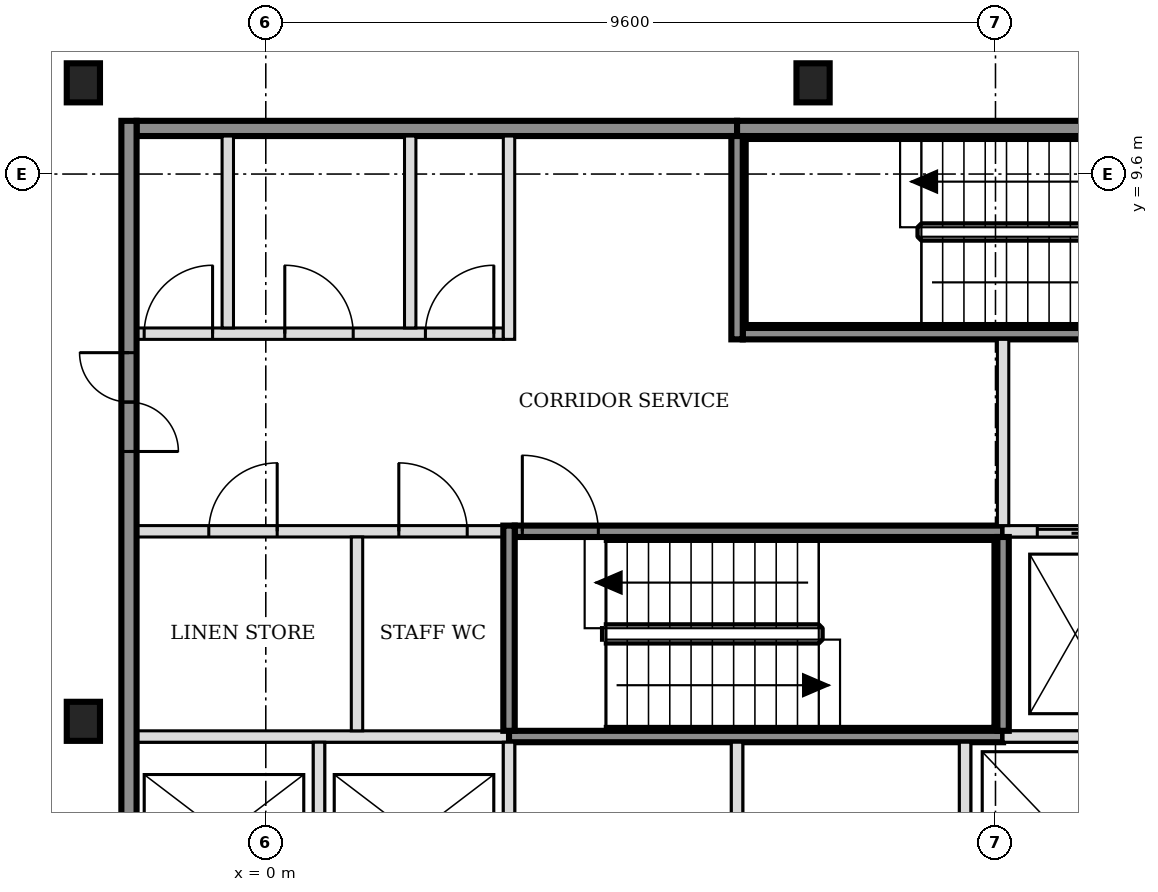
"""IFC4 building model, lengths in metres.
Left out: names, types, materials, properties, quantities, classifications, styles, units other than length and angle.
Written with IfcOpenShell. Run it as: python <this file> out.ifc"""

import sys

from ifc_helpers import new_model, si_unit, direction, frame, frame_2d, origin, origin_2d, place, context, subcontext, project, spatial, rectangle, i_section, extrude, element, fill, save


model = new_model("IFC4")
c1 = context("Model", 3, precision=1e-05, world=origin(), true_north=direction((0.0, 1.0)))
c2 = subcontext(c1, "Body", "Model", "MODEL_VIEW")
j1 = project(units=[si_unit("LENGTHUNIT", "METRE"), si_unit("PLANEANGLEUNIT", "RADIAN")], contexts=[c1])
p1 = place(None, origin())
s1 = spatial("IfcSite", under=j1, at=p1, CompositionType="ELEMENT")
p2 = place(p1, origin())
s2 = spatial("IfcBuilding", under=s1, at=p2, CompositionType="ELEMENT")
p3 = place(p2, frame((0.0, 0.0, 94.2)))
s3 = spatial("IfcBuildingStorey", under=s2, at=p3, CompositionType="ELEMENT", Elevation=94.2)
for number, where, z_axis, x_axis in (
    (1, (-2.4, 2.4, -0.15), (0.0, 0.0, 1.0), (1.0, 0.0, 0.0)),
    (2, (-2.4, 10.8, -0.15), (0.0, 0.0, 1.0), (1.0, 0.0, 0.0)),
    (3, (7.2, 10.8, -0.15), (0.0, 0.0, 1.0), (1.0, 0.0, 0.0)),
):
    element("IfcColumn", number, at=place(p3, frame(where, z_axis=z_axis, x_axis=x_axis)), inside=s3, PredefinedType="COLUMN", context=c2, shape_type="SweptSolid", body=[
        extrude(i_section(OverallWidth=0.437, OverallDepth=0.514, WebThickness=0.061, FlangeThickness=0.097, FilletRadius=0.015, at=origin_2d()), origin(), (0.0, 0.0, 1.0), 3.6),
    ])
p4 = place(p3, frame((-1.7, 2.2, 0.0), z_axis=(0.0, 0.0, 1.0), x_axis=(1.0, 0.0, 0.0)))
e4 = element("IfcWall", 4, at=p4, inside=s3, PredefinedType="SOLIDWALL", context=c2, shape_type="SweptSolid", body=[
    extrude(rectangle(XDim=4.9, YDim=0.15, at=frame_2d((2.45, 0.0))), origin(), (0.0, 0.0, 1.0), 3.45),
])
p5 = place(p3, frame((3.2, 2.2, 0.0), z_axis=(0.0, 0.0, 1.0), x_axis=(1.0, 0.0, 0.0)))
e5 = element("IfcWall", 5, at=p5, inside=s3, PredefinedType="SOLIDWALL", context=c2, shape_type="SweptSolid", body=[
    extrude(rectangle(XDim=6.5, YDim=0.15, at=frame_2d((3.25, 0.0))), origin(), (0.0, 0.0, 1.0), 3.45),
])
p6 = place(p3, frame((9.7, 2.2, 0.0), z_axis=(0.0, 0.0, 1.0), x_axis=(1.0, 0.0, 0.0)))
e6 = element("IfcWall", 6, at=p6, inside=s3, PredefinedType="SOLIDWALL", context=c2, shape_type="SweptSolid", body=[
    extrude(rectangle(XDim=4.525, YDim=0.15, at=frame_2d((2.263, 0.0))), origin(), (0.0, 0.0, 1.0), 3.45),
])
p7 = place(p3, frame((-1.7, 4.9, 0.0), z_axis=(0.0, 0.0, 1.0), x_axis=(1.0, 0.0, 0.0)))
e7 = element("IfcWall", 7, at=p7, inside=s3, PredefinedType="PARTITIONING", context=c2, shape_type="SweptSolid", body=[
    extrude(rectangle(XDim=4.825, YDim=0.15, at=frame_2d((2.413, 0.0))), origin(), (0.0, 0.0, 1.0), 3.45),
])
p8 = place(p7, frame((0.95, 0.0, 0.0)))
e8 = element("IfcOpeningElement", 8, at=p8, cuts=e7, PredefinedType="OPENING", context=c2, shape_type="SweptSolid", body=[
    extrude(rectangle(XDim=0.9, YDim=2.1, at=frame_2d((0.45, 1.05))), frame((0.0, 0.085, 0.0), z_axis=(0.0, -1.0, 0.0), x_axis=(1.0, 0.0, 0.0)), (0.0, 0.0, 1.0), 0.17),
])
p9 = place(p7, frame((3.45, 0.0, 0.0)))
e9 = element("IfcOpeningElement", 9, at=p9, cuts=e7, PredefinedType="OPENING", context=c2, shape_type="SweptSolid", body=[
    extrude(rectangle(XDim=0.9, YDim=2.1, at=frame_2d((0.45, 1.05))), frame((0.0, 0.085, 0.0), z_axis=(0.0, -1.0, 0.0), x_axis=(1.0, 0.0, 0.0)), (0.0, 0.0, 1.0), 0.17),
])
p10 = place(p3, frame((3.275, 4.9, 0.0), z_axis=(0.0, 0.0, 1.0), x_axis=(1.0, 0.0, 0.0)))
e10 = element("IfcWall", 10, at=p10, inside=s3, PredefinedType="SOLIDWALL", context=c2, shape_type="SweptSolid", body=[
    extrude(rectangle(XDim=6.425, YDim=0.15, at=frame_2d((3.212, 0.0))), origin(), (0.0, 0.0, 1.0), 3.45),
])
p11 = place(p10, frame((0.1, 0.0, 0.0)))
e11 = element("IfcOpeningElement", 11, at=p11, cuts=e10, PredefinedType="OPENING", context=c2, shape_type="SweptSolid", body=[
    extrude(rectangle(XDim=1.0, YDim=2.1, at=frame_2d((0.5, 1.05))), frame((0.0, 0.085, 0.0), z_axis=(0.0, -1.0, 0.0), x_axis=(1.0, 0.0, 0.0)), (0.0, 0.0, 1.0), 0.17),
])
p12 = place(p3, frame((9.7, 4.9, 0.0), z_axis=(0.0, 0.0, 1.0), x_axis=(1.0, 0.0, 0.0)))
e12 = element("IfcWall", 12, at=p12, inside=s3, PredefinedType="SOLIDWALL", context=c2, shape_type="SweptSolid", body=[
    extrude(rectangle(XDim=6.4, YDim=0.15, at=frame_2d((3.2, 0.0))), origin(), (0.0, 0.0, 1.0), 3.45),
])
p13 = place(p12, frame((0.45, 0.0, 0.0)))
e13 = element("IfcOpeningElement", 13, at=p13, cuts=e12, PredefinedType="OPENING", context=c2, shape_type="SweptSolid", body=[
    extrude(rectangle(XDim=1.0, YDim=2.1, at=frame_2d((0.5, 1.05))), frame((0.0, 0.085, 0.0), z_axis=(0.0, -1.0, 0.0), x_axis=(1.0, 0.0, 0.0)), (0.0, 0.0, 1.0), 0.17),
])
p14 = place(p12, frame((2.35, 0.0, 0.0)))
e14 = element("IfcOpeningElement", 14, at=p14, cuts=e12, PredefinedType="OPENING", context=c2, shape_type="SweptSolid", body=[
    extrude(rectangle(XDim=1.0, YDim=2.1, at=frame_2d((0.5, 1.05))), frame((0.0, 0.085, 0.0), z_axis=(0.0, -1.0, 0.0), x_axis=(1.0, 0.0, 0.0)), (0.0, 0.0, 1.0), 0.17),
])
p15 = place(p12, frame((4.7, 0.0, 0.0)))
e15 = element("IfcOpeningElement", 15, at=p15, cuts=e12, PredefinedType="OPENING", context=c2, shape_type="SweptSolid", body=[
    extrude(rectangle(XDim=0.9, YDim=2.1, at=frame_2d((0.45, 1.05))), frame((0.0, 0.085, 0.0), z_axis=(0.0, -1.0, 0.0), x_axis=(1.0, 0.0, 0.0)), (0.0, 0.0, 1.0), 0.17),
])
p16 = place(p3, frame((-1.7, 7.5, 0.0), z_axis=(0.0, 0.0, 1.0), x_axis=(1.0, 0.0, 0.0)))
e16 = element("IfcWall", 16, at=p16, inside=s3, PredefinedType="PARTITIONING", context=c2, shape_type="SweptSolid", body=[
    extrude(rectangle(XDim=4.825, YDim=0.15, at=frame_2d((2.413, 0.0))), origin(), (0.0, 0.0, 1.0), 3.45),
])
p17 = place(p16, frame((0.1, 0.0, 0.0)))
e17 = element("IfcOpeningElement", 17, at=p17, cuts=e16, PredefinedType="OPENING", context=c2, shape_type="SweptSolid", body=[
    extrude(rectangle(XDim=0.9, YDim=2.1, at=frame_2d((0.45, 1.05))), frame((0.0, 0.085, 0.0), z_axis=(0.0, -1.0, 0.0), x_axis=(1.0, 0.0, 0.0)), (0.0, 0.0, 1.0), 0.17),
])
p18 = place(p16, frame((1.95, 0.0, 0.0)))
e18 = element("IfcOpeningElement", 18, at=p18, cuts=e16, PredefinedType="OPENING", context=c2, shape_type="SweptSolid", body=[
    extrude(rectangle(XDim=0.9, YDim=2.1, at=frame_2d((0.45, 1.05))), frame((0.0, 0.085, 0.0), z_axis=(0.0, -1.0, 0.0), x_axis=(1.0, 0.0, 0.0)), (0.0, 0.0, 1.0), 0.17),
])
p19 = place(p16, frame((3.8, 0.0, 0.0)))
e19 = element("IfcOpeningElement", 19, at=p19, cuts=e16, PredefinedType="OPENING", context=c2, shape_type="SweptSolid", body=[
    extrude(rectangle(XDim=0.9, YDim=2.1, at=frame_2d((0.45, 1.05))), frame((0.0, 0.085, 0.0), z_axis=(0.0, -1.0, 0.0), x_axis=(1.0, 0.0, 0.0)), (0.0, 0.0, 1.0), 0.17),
])
p20 = place(p3, frame((6.275, 7.5, 0.0), z_axis=(0.0, 0.0, 1.0), x_axis=(1.0, 0.0, 0.0)))
e20 = element("IfcWall", 20, at=p20, inside=s3, PredefinedType="SOLIDWALL", context=c2, shape_type="SweptSolid", body=[
    extrude(rectangle(XDim=6.425, YDim=0.15, at=frame_2d((3.212, 0.0))), origin(), (0.0, 0.0, 1.0), 3.45),
])
p21 = place(p20, frame((5.225, 0.0, 0.0)))
e21 = element("IfcOpeningElement", 21, at=p21, cuts=e20, PredefinedType="OPENING", context=c2, shape_type="SweptSolid", body=[
    extrude(rectangle(XDim=1.0, YDim=2.1, at=frame_2d((0.5, 1.05))), frame((0.0, 0.085, 0.0), z_axis=(0.0, -1.0, 0.0), x_axis=(1.0, 0.0, 0.0)), (0.0, 0.0, 1.0), 0.17),
])
p22 = place(p3, frame((-1.7, 10.2, 0.0), z_axis=(0.0, 0.0, 1.0), x_axis=(1.0, 0.0, 0.0)))
e22 = element("IfcWall", 22, at=p22, inside=s3, PredefinedType="SOLIDWALL", context=c2, shape_type="SweptSolid", body=[
    extrude(rectangle(XDim=7.9, YDim=0.2, at=frame_2d((3.95, 0.0))), origin(), (0.0, 0.0, 1.0), 3.45),
])
p23 = place(p3, frame((6.2, 10.2, 0.0), z_axis=(0.0, 0.0, 1.0), x_axis=(1.0, 0.0, 0.0)))
e23 = element("IfcWall", 23, at=p23, inside=s3, PredefinedType="SOLIDWALL", context=c2, shape_type="SweptSolid", body=[
    extrude(rectangle(XDim=6.5, YDim=0.2, at=frame_2d((3.25, 0.0))), origin(), (0.0, 0.0, 1.0), 3.45),
])
p24 = place(p3, frame((-1.8, -5.5, 0.0), z_axis=(0.0, 0.0, 1.0), x_axis=(0.0, 1.0, 0.0)))
e24 = element("IfcWall", 24, at=p24, inside=s3, PredefinedType="SOLIDWALL", context=c2, shape_type="SweptSolid", body=[
    extrude(rectangle(XDim=15.8, YDim=0.2, at=frame_2d((7.9, 0.0))), origin(), (0.0, 0.0, 1.0), 3.45),
])
p25 = place(p24, frame((3.05, 0.0, 0.0)))
e25 = element("IfcOpeningElement", 25, at=p25, cuts=e24, PredefinedType="OPENING", context=c2, shape_type="SweptSolid", body=[
    extrude(rectangle(XDim=1.3, YDim=2.1, at=frame_2d((0.65, 1.05))), frame((0.0, 0.11, 0.0), z_axis=(0.0, -1.0, 0.0), x_axis=(1.0, 0.0, 0.0)), (0.0, 0.0, 1.0), 0.22),
])
p26 = place(p24, frame((11.45, 0.0, 0.0)))
e26 = element("IfcOpeningElement", 26, at=p26, cuts=e24, PredefinedType="OPENING", context=c2, shape_type="SweptSolid", body=[
    extrude(rectangle(XDim=1.3, YDim=2.1, at=frame_2d((0.65, 1.05))), frame((0.0, 0.11, 0.0), z_axis=(0.0, -1.0, 0.0), x_axis=(1.0, 0.0, 0.0)), (0.0, 0.0, 1.0), 0.22),
])
p27 = place(p3, frame((-0.5, 7.575, 0.0), z_axis=(0.0, 0.0, 1.0), x_axis=(0.0, 1.0, 0.0)))
e27 = element("IfcWall", 27, at=p27, inside=s3, PredefinedType="PARTITIONING", context=c2, shape_type="SweptSolid", body=[
    extrude(rectangle(XDim=2.525, YDim=0.15, at=frame_2d((1.263, 0.0))), origin(), (0.0, 0.0, 1.0), 3.45),
])
p28 = place(p3, frame((0.7, -0.325, 0.0), z_axis=(0.0, 0.0, 1.0), x_axis=(0.0, 1.0, 0.0)))
e28 = element("IfcWall", 28, at=p28, inside=s3, PredefinedType="SOLIDWALL", context=c2, shape_type="SweptSolid", body=[
    extrude(rectangle(XDim=2.45, YDim=0.15, at=frame_2d((1.225, 0.0))), origin(), (0.0, 0.0, 1.0), 3.45),
])
p29 = place(p3, frame((1.2, 2.275, 0.0), z_axis=(0.0, 0.0, 1.0), x_axis=(0.0, 1.0, 0.0)))
e29 = element("IfcWall", 29, at=p29, inside=s3, PredefinedType="PARTITIONING", context=c2, shape_type="SweptSolid", body=[
    extrude(rectangle(XDim=2.55, YDim=0.15, at=frame_2d((1.275, 0.0))), origin(), (0.0, 0.0, 1.0), 3.45),
])
p30 = place(p3, frame((1.9, 7.575, 0.0), z_axis=(0.0, 0.0, 1.0), x_axis=(0.0, 1.0, 0.0)))
e30 = element("IfcWall", 30, at=p30, inside=s3, PredefinedType="PARTITIONING", context=c2, shape_type="SweptSolid", body=[
    extrude(rectangle(XDim=2.525, YDim=0.15, at=frame_2d((1.263, 0.0))), origin(), (0.0, 0.0, 1.0), 3.45),
])
p31 = place(p3, frame((3.2, -0.325, 0.0), z_axis=(0.0, 0.0, 1.0), x_axis=(0.0, 1.0, 0.0)))
e31 = element("IfcWall", 31, at=p31, inside=s3, PredefinedType="SOLIDWALL", context=c2, shape_type="SweptSolid", body=[
    extrude(rectangle(XDim=2.45, YDim=0.15, at=frame_2d((1.225, 0.0))), origin(), (0.0, 0.0, 1.0), 3.45),
])
p32 = place(p3, frame((3.2, 2.275, 0.0), z_axis=(0.0, 0.0, 1.0), x_axis=(0.0, 1.0, 0.0)))
e32 = element("IfcWall", 32, at=p32, inside=s3, PredefinedType="SOLIDWALL", context=c2, shape_type="SweptSolid", body=[
    extrude(rectangle(XDim=2.7, YDim=0.15, at=frame_2d((1.35, 0.0))), origin(), (0.0, 0.0, 1.0), 3.45),
])
p33 = place(p3, frame((3.2, 7.425, 0.0), z_axis=(0.0, 0.0, 1.0), x_axis=(0.0, 1.0, 0.0)))
e33 = element("IfcWall", 33, at=p33, inside=s3, PredefinedType="PARTITIONING", context=c2, shape_type="SweptSolid", body=[
    extrude(rectangle(XDim=2.675, YDim=0.15, at=frame_2d((1.337, 0.0))), origin(), (0.0, 0.0, 1.0), 3.45),
])
p34 = place(p3, frame((6.2, -0.325, 0.0), z_axis=(0.0, 0.0, 1.0), x_axis=(0.0, 1.0, 0.0)))
e34 = element("IfcWall", 34, at=p34, inside=s3, PredefinedType="SOLIDWALL", context=c2, shape_type="SweptSolid", body=[
    extrude(rectangle(XDim=2.45, YDim=0.15, at=frame_2d((1.225, 0.0))), origin(), (0.0, 0.0, 1.0), 3.45),
])
p35 = place(p3, frame((6.2, 7.425, 0.0), z_axis=(0.0, 0.0, 1.0), x_axis=(0.0, 1.0, 0.0)))
e35 = element("IfcWall", 35, at=p35, inside=s3, PredefinedType="SOLIDWALL", context=c2, shape_type="SweptSolid", body=[
    extrude(rectangle(XDim=2.675, YDim=0.15, at=frame_2d((1.337, 0.0))), origin(), (0.0, 0.0, 1.0), 3.45),
])
p36 = place(p3, frame((9.2, -0.325, 0.0), z_axis=(0.0, 0.0, 1.0), x_axis=(0.0, 1.0, 0.0)))
e36 = element("IfcWall", 36, at=p36, inside=s3, PredefinedType="SOLIDWALL", context=c2, shape_type="SweptSolid", body=[
    extrude(rectangle(XDim=2.45, YDim=0.15, at=frame_2d((1.225, 0.0))), origin(), (0.0, 0.0, 1.0), 3.45),
])
p37 = place(p3, frame((9.7, 2.275, 0.0), z_axis=(0.0, 0.0, 1.0), x_axis=(0.0, 1.0, 0.0)))
e37 = element("IfcWall", 37, at=p37, inside=s3, PredefinedType="SOLIDWALL", context=c2, shape_type="SweptSolid", body=[
    extrude(rectangle(XDim=2.55, YDim=0.15, at=frame_2d((1.275, 0.0))), origin(), (0.0, 0.0, 1.0), 3.45),
])
p38 = place(p3, frame((9.7, 4.975, 0.0), z_axis=(0.0, 0.0, 1.0), x_axis=(0.0, 1.0, 0.0)))
e38 = element("IfcWall", 38, at=p38, inside=s3, PredefinedType="SOLIDWALL", context=c2, shape_type="SweptSolid", body=[
    extrude(rectangle(XDim=2.45, YDim=0.15, at=frame_2d((1.225, 0.0))), origin(), (0.0, 0.0, 1.0), 3.45),
])
p39 = place(p13, origin())
e39 = element("IfcDoor", 39, at=p39, inside=s3, OperationType="DOUBLE_DOOR_SLIDING", PredefinedType="DOOR", context=c2, shape_type="SweptSolid", body=[
    extrude(rectangle(XDim=1.0, YDim=2.1, at=frame_2d((0.5, 1.05))), frame((0.0, 0.025, 0.0), z_axis=(0.0, -1.0, 0.0), x_axis=(1.0, 0.0, 0.0)), (0.0, 0.0, 1.0), 0.05),
])
fill(e13, e39)
p40 = place(p11, origin())
e40 = element("IfcDoor", 40, at=p40, inside=s3, OperationType="SINGLE_SWING_LEFT", PredefinedType="DOOR", context=c2, shape_type="SweptSolid", body=[
    extrude(rectangle(XDim=1.0, YDim=2.1, at=frame_2d((0.5, 1.05))), frame((0.0, 0.025, 0.0), z_axis=(0.0, -1.0, 0.0), x_axis=(1.0, 0.0, 0.0)), (0.0, 0.0, 1.0), 0.05),
])
fill(e11, e40)
p41 = place(p26, origin())
e41 = element("IfcDoor", 41, at=p41, inside=s3, OperationType="DOUBLE_DOOR_SINGLE_SWING", PredefinedType="DOOR", context=c2, shape_type="SweptSolid", body=[
    extrude(rectangle(XDim=1.3, YDim=2.1, at=frame_2d((0.65, 1.05))), frame((0.0, 0.025, 0.0), z_axis=(0.0, -1.0, 0.0), x_axis=(1.0, 0.0, 0.0)), (0.0, 0.0, 1.0), 0.05),
])
fill(e26, e41)
p42 = place(p8, origin())
e42 = element("IfcDoor", 42, at=p42, inside=s3, OperationType="SINGLE_SWING_RIGHT", PredefinedType="DOOR", context=c2, shape_type="SweptSolid", body=[
    extrude(rectangle(XDim=0.9, YDim=2.1, at=frame_2d((0.45, 1.05))), frame((0.0, 0.025, 0.0), z_axis=(0.0, -1.0, 0.0), x_axis=(1.0, 0.0, 0.0)), (0.0, 0.0, 1.0), 0.05),
])
fill(e8, e42)
p43 = place(p9, origin())
e43 = element("IfcDoor", 43, at=p43, inside=s3, OperationType="SINGLE_SWING_LEFT", PredefinedType="DOOR", context=c2, shape_type="SweptSolid", body=[
    extrude(rectangle(XDim=0.9, YDim=2.1, at=frame_2d((0.45, 1.05))), frame((0.0, 0.025, 0.0), z_axis=(0.0, -1.0, 0.0), x_axis=(1.0, 0.0, 0.0)), (0.0, 0.0, 1.0), 0.05),
])
fill(e9, e43)
p44 = place(p17, origin())
e44 = element("IfcDoor", 44, at=p44, inside=s3, OperationType="SINGLE_SWING_RIGHT", PredefinedType="DOOR", context=c2, shape_type="SweptSolid", body=[
    extrude(rectangle(XDim=0.9, YDim=2.1, at=frame_2d((0.45, 1.05))), frame((0.0, 0.025, 0.0), z_axis=(0.0, -1.0, 0.0), x_axis=(1.0, 0.0, 0.0)), (0.0, 0.0, 1.0), 0.05),
])
fill(e17, e44)
p45 = place(p18, origin())
e45 = element("IfcDoor", 45, at=p45, inside=s3, OperationType="SINGLE_SWING_LEFT", PredefinedType="DOOR", context=c2, shape_type="SweptSolid", body=[
    extrude(rectangle(XDim=0.9, YDim=2.1, at=frame_2d((0.45, 1.05))), frame((0.0, 0.025, 0.0), z_axis=(0.0, -1.0, 0.0), x_axis=(1.0, 0.0, 0.0)), (0.0, 0.0, 1.0), 0.05),
])
fill(e18, e45)
p46 = place(p19, origin())
e46 = element("IfcDoor", 46, at=p46, inside=s3, OperationType="SINGLE_SWING_RIGHT", PredefinedType="DOOR", context=c2, shape_type="SweptSolid", body=[
    extrude(rectangle(XDim=0.9, YDim=2.1, at=frame_2d((0.45, 1.05))), frame((0.0, 0.025, 0.0), z_axis=(0.0, -1.0, 0.0), x_axis=(1.0, 0.0, 0.0)), (0.0, 0.0, 1.0), 0.05),
])
fill(e19, e46)
save(model, sys.argv[1])
